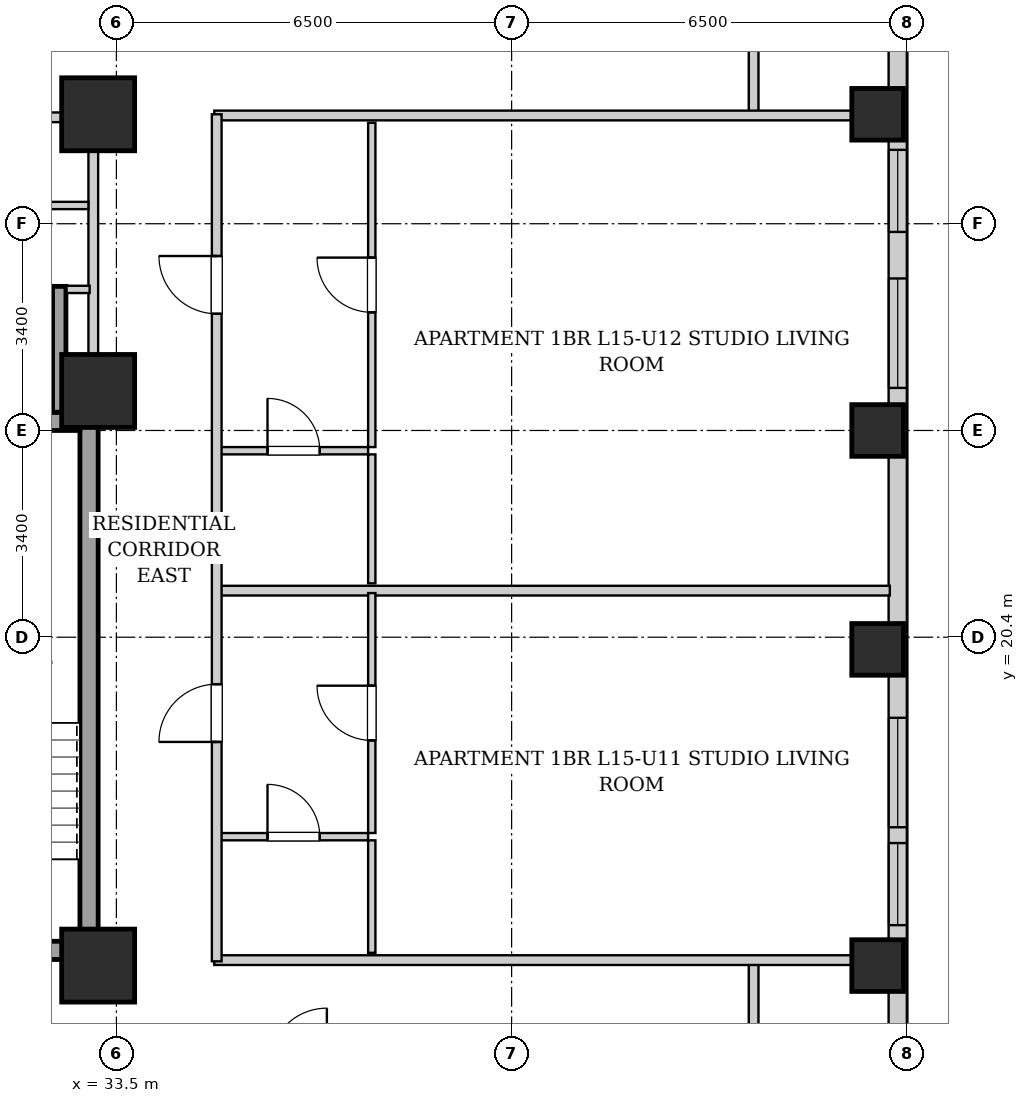
"""IFC4 building model, lengths in metres.
Left out: names, types, materials, properties, quantities, classifications, styles, units other than length and angle.
Written with IfcOpenShell. Run it as: python <this file> out.ifc"""

import sys

from ifc_helpers import new_model, si_unit, direction, frame, frame_2d, origin, origin_2d, place, context, subcontext, project, spatial, rectangle, extrude, element, fill, save


model = new_model("IFC4")
c1 = context("Model", 3, precision=1e-05, world=origin(), true_north=direction((0.0, 1.0)))
c2 = subcontext(c1, "Body", "Model", "MODEL_VIEW")
j1 = project(units=[si_unit("LENGTHUNIT", "METRE"), si_unit("PLANEANGLEUNIT", "RADIAN")], contexts=[c1])
p1 = place(None, origin())
s1 = spatial("IfcSite", under=j1, at=p1, CompositionType="ELEMENT")
p2 = place(p1, origin())
s2 = spatial("IfcBuilding", under=s1, at=p2, CompositionType="ELEMENT")
p3 = place(p2, frame((0.0, 0.0, 57.8)))
s3 = spatial("IfcBuildingStorey", under=s2, at=p3, CompositionType="ELEMENT", Elevation=57.8)
for number, where, z_axis, x_axis in (
    (1, (46.02, 15.0, 0.0), (0.0, 0.0, 1.0), (1.0, 0.0, 0.0)),
    (2, (46.02, 20.2, 0.0), (0.0, 0.0, 1.0), (1.0, 0.0, 0.0)),
    (3, (46.02, 23.8, 0.0), (0.0, 0.0, 1.0), (1.0, 0.0, 0.0)),
    (4, (46.02, 29.0, 0.0), (0.0, 0.0, 1.0), (1.0, 0.0, 0.0)),
):
    element("IfcColumn", number, at=place(p3, frame(where, z_axis=z_axis, x_axis=x_axis)), inside=s3, PredefinedType="COLUMN", context=c2, shape_type="SweptSolid", body=[
        extrude(rectangle(XDim=0.85, YDim=0.85, at=origin_2d()), origin(), (0.0, 0.0, 1.0), 3.2),
    ])
for number, where, z_axis, x_axis in (
    (5, (33.2, 15.0, 0.0), (0.0, 0.0, 1.0), (1.0, 0.0, 0.0)),
    (6, (33.2, 29.0, 0.0), (0.0, 0.0, 1.0), (1.0, 0.0, 0.0)),
    (7, (33.2, 24.45, 0.0), (0.0, 0.0, 1.0), (1.0, 0.0, 0.0)),
):
    element("IfcColumn", number, at=place(p3, frame(where, z_axis=z_axis, x_axis=x_axis)), inside=s3, PredefinedType="COLUMN", context=c2, shape_type="SweptSolid", body=[
        extrude(rectangle(XDim=1.2, YDim=1.2, at=origin_2d()), origin(), (0.0, 0.0, 1.0), 3.2),
    ])
p4 = place(p3, frame((46.35, 45.1, 0.0), z_axis=(0.0, 0.0, 1.0), x_axis=(0.0, -1.0, 0.0)))
e8 = element("IfcWall", 8, at=p4, inside=s3, PredefinedType="SOLIDWALL", context=c2, shape_type="SweptSolid", body=[
    extrude(rectangle(XDim=42.6, YDim=0.3, at=frame_2d((21.3, 0.0))), origin(), (0.0, 0.0, 1.0), 1.975),
])
p5 = place(p4, frame((37.575, 0.0, 0.55)))
e9 = element("IfcOpeningElement", 9, at=p5, cuts=e8, PredefinedType="OPENING", context=c2, shape_type="SweptSolid", body=[
    extrude(rectangle(XDim=1.8, YDim=1.2, at=frame_2d((0.9, 0.6))), frame((0.0, 0.16, 0.0), z_axis=(0.0, -1.0, 0.0), x_axis=(1.0, 0.0, 0.0)), (0.0, 0.0, 1.0), 0.32),
])
p6 = place(p4, frame((34.85, 0.0, 0.55)))
e10 = element("IfcOpeningElement", 10, at=p6, cuts=e8, PredefinedType="OPENING", context=c2, shape_type="SweptSolid", body=[
    extrude(rectangle(XDim=1.35, YDim=1.2, at=frame_2d((0.675, 0.6))), frame((0.0, 0.16, 0.0), z_axis=(0.0, -1.0, 0.0), x_axis=(1.0, 0.0, 0.0)), (0.0, 0.0, 1.0), 0.32),
])
p7 = place(p4, frame((3.715, 0.0, 0.55)))
e11 = element("IfcOpeningElement", 11, at=p7, cuts=e8, PredefinedType="OPENING", context=c2, shape_type="SweptSolid", body=[
    extrude(rectangle(XDim=1.8, YDim=1.2, at=frame_2d((0.9, 0.6))), frame((0.0, 0.16, 0.0), z_axis=(0.0, -1.0, 0.0), x_axis=(1.0, 0.0, 0.0)), (0.0, 0.0, 1.0), 0.32),
])
p8 = place(p4, frame((1.185, 0.0, 0.55)))
e12 = element("IfcOpeningElement", 12, at=p8, cuts=e8, PredefinedType="OPENING", context=c2, shape_type="SweptSolid", body=[
    extrude(rectangle(XDim=1.35, YDim=1.2, at=frame_2d((0.675, 0.6))), frame((0.0, 0.16, 0.0), z_axis=(0.0, -1.0, 0.0), x_axis=(1.0, 0.0, 0.0)), (0.0, 0.0, 1.0), 0.32),
])
p9 = place(p4, frame((26.025, 0.0, 0.55)))
e13 = element("IfcOpeningElement", 13, at=p9, cuts=e8, PredefinedType="OPENING", context=c2, shape_type="SweptSolid", body=[
    extrude(rectangle(XDim=1.8, YDim=1.2, at=frame_2d((0.9, 0.6))), frame((0.0, 0.16, 0.0), z_axis=(0.0, -1.0, 0.0), x_axis=(1.0, 0.0, 0.0)), (0.0, 0.0, 1.0), 0.32),
])
p10 = place(p4, frame((28.085, 0.0, 0.55)))
e14 = element("IfcOpeningElement", 14, at=p10, cuts=e8, PredefinedType="OPENING", context=c2, shape_type="SweptSolid", body=[
    extrude(rectangle(XDim=1.35, YDim=1.2, at=frame_2d((0.675, 0.6))), frame((0.0, 0.16, 0.0), z_axis=(0.0, -1.0, 0.0), x_axis=(1.0, 0.0, 0.0)), (0.0, 0.0, 1.0), 0.32),
])
p11 = place(p4, frame((18.8, 0.0, 0.55)))
e15 = element("IfcOpeningElement", 15, at=p11, cuts=e8, PredefinedType="OPENING", context=c2, shape_type="SweptSolid", body=[
    extrude(rectangle(XDim=1.8, YDim=1.2, at=frame_2d((0.9, 0.6))), frame((0.0, 0.16, 0.0), z_axis=(0.0, -1.0, 0.0), x_axis=(1.0, 0.0, 0.0)), (0.0, 0.0, 1.0), 0.32),
])
p12 = place(p4, frame((16.685, 0.0, 0.55)))
e16 = element("IfcOpeningElement", 16, at=p12, cuts=e8, PredefinedType="OPENING", context=c2, shape_type="SweptSolid", body=[
    extrude(rectangle(XDim=1.35, YDim=1.2, at=frame_2d((0.675, 0.6))), frame((0.0, 0.16, 0.0), z_axis=(0.0, -1.0, 0.0), x_axis=(1.0, 0.0, 0.0)), (0.0, 0.0, 1.0), 0.32),
])
p13 = place(p3, frame((33.05, 15.1, 0.0), z_axis=(0.0, 0.0, 1.0), x_axis=(0.0, 1.0, 0.0)))
e17 = element("IfcWall", 17, at=p13, inside=s3, PredefinedType="SHEAR", context=c2, shape_type="SweptSolid", body=[
    extrude(rectangle(XDim=9.0, YDim=0.3, at=frame_2d((4.5, 0.0))), origin(), (0.0, 0.0, 1.0), 2.94),
])
p14 = place(p3, frame((30.05, 23.95, 0.0), z_axis=(0.0, 0.0, 1.0), x_axis=(1.0, 0.0, 0.0)))
e18 = element("IfcWall", 18, at=p14, inside=s3, PredefinedType="SHEAR", context=c2, shape_type="SweptSolid", body=[
    extrude(rectangle(XDim=2.85, YDim=0.3, at=frame_2d((1.425, 0.0))), origin(), (0.0, 0.0, 1.0), 2.94),
])
p15 = place(p3, frame((30.05, 15.25, 0.0), z_axis=(0.0, 0.0, 1.0), x_axis=(1.0, 0.0, 0.0)))
e19 = element("IfcWall", 19, at=p15, inside=s3, PredefinedType="SHEAR", context=c2, shape_type="SweptSolid", body=[
    extrude(rectangle(XDim=2.85, YDim=0.3, at=frame_2d((1.425, 0.0))), origin(), (0.0, 0.0, 1.0), 2.94),
])
p16 = place(p15, frame((0.86, 0.0, 0.0)))
e20 = element("IfcOpeningElement", 20, at=p16, cuts=e19, PredefinedType="OPENING", context=c2, shape_type="SweptSolid", body=[
    extrude(rectangle(XDim=1.1, YDim=2.05, at=frame_2d((0.55, 1.025))), frame((0.0, 0.16, 0.0), z_axis=(0.0, -1.0, 0.0), x_axis=(1.0, 0.0, 0.0)), (0.0, 0.0, 1.0), 0.32),
])
p17 = place(p3, frame((32.56, 24.1, 0.0), z_axis=(0.0, 0.0, 1.0), x_axis=(0.0, 1.0, 0.0)))
e21 = element("IfcWall", 21, at=p17, inside=s3, PredefinedType="SHEAR", context=c2, shape_type="SweptSolid", body=[
    extrude(rectangle(XDim=2.07, YDim=0.22, at=frame_2d((1.035, 0.0))), origin(), (0.0, 0.0, 1.0), 2.94),
])
p18 = place(p3, frame((33.12, 24.12, 0.0), z_axis=(0.0, 0.0, 1.0), x_axis=(0.0, 1.0, 0.0)))
e22 = element("IfcWall", 22, at=p18, inside=s3, PredefinedType="PARTITIONING", context=c2, shape_type="SweptSolid", body=[
    extrude(rectangle(XDim=4.76, YDim=0.16, at=frame_2d((2.38, 0.0))), origin(), (0.0, 0.0, 1.0), 2.275),
])
p19 = place(p3, frame((32.68, 26.12, 0.0), z_axis=(0.0, 0.0, 1.0), x_axis=(1.0, 0.0, 0.0)))
e23 = element("IfcWall", 23, at=p19, inside=s3, PredefinedType="PARTITIONING", context=c2, shape_type="SweptSolid", body=[
    extrude(rectangle(XDim=0.38, YDim=0.12, at=frame_2d((0.19, 0.0))), origin(), (0.0, 0.0, 1.0), 2.94),
])
p20 = place(p3, frame((30.16, 27.5, 0.0), z_axis=(0.0, 0.0, 1.0), x_axis=(1.0, 0.0, 0.0)))
e24 = element("IfcWall", 24, at=p20, inside=s3, PredefinedType="PARTITIONING", context=c2, shape_type="SweptSolid", body=[
    extrude(rectangle(XDim=2.88, YDim=0.12, at=frame_2d((1.44, 0.0))), origin(), (0.0, 0.0, 1.0), 2.94),
])
p21 = place(p20, frame((0.97, 0.0, 0.0)))
e25 = element("IfcOpeningElement", 25, at=p21, cuts=e24, PredefinedType="OPENING", context=c2, shape_type="SweptSolid", body=[
    extrude(rectangle(XDim=0.86, YDim=2.05, at=frame_2d((0.43, 1.025))), frame((0.0, 0.07, 0.0), z_axis=(0.0, -1.0, 0.0), x_axis=(1.0, 0.0, 0.0)), (0.0, 0.0, 1.0), 0.14),
])
p22 = place(p3, frame((30.08, 28.95, 0.0), z_axis=(0.0, 0.0, 1.0), x_axis=(1.0, 0.0, 0.0)))
e26 = element("IfcWall", 26, at=p22, inside=s3, PredefinedType="PARTITIONING", context=c2, shape_type="SweptSolid", body=[
    extrude(rectangle(XDim=2.96, YDim=0.16, at=frame_2d((1.48, 0.0))), origin(), (0.0, 0.0, 1.0), 2.94),
])
p23 = place(p22, frame((1.045, 0.0, 0.0)))
e27 = element("IfcOpeningElement", 27, at=p23, cuts=e26, PredefinedType="OPENING", context=c2, shape_type="SweptSolid", body=[
    extrude(rectangle(XDim=0.86, YDim=2.05, at=frame_2d((0.43, 1.025))), frame((0.0, 0.09, 0.0), z_axis=(0.0, -1.0, 0.0), x_axis=(1.0, 0.0, 0.0)), (0.0, 0.0, 1.0), 0.18),
])
for number, where, z_axis, x_axis in (
    (28, (43.98, 13.35, 0.0), (0.0, 0.0, 1.0), (0.0, 1.0, 0.0)),
    (29, (43.98, 28.98, 0.0), (0.0, 0.0, 1.0), (0.0, 1.0, 0.0)),
):
    element("IfcWall", number, at=place(p3, frame(where, z_axis=z_axis, x_axis=x_axis)), inside=s3, PredefinedType="PARTITIONING", context=c2, shape_type="SweptSolid", body=[
        extrude(rectangle(XDim=1.74, YDim=0.16, at=frame_2d((0.87, 0.0))), origin(), (0.0, 0.0, 1.0), 2.94),
    ])
for number, where, z_axis, x_axis in (
    (30, (35.11, 15.09, 0.0), (0.0, 0.0, 1.0), (1.0, 0.0, 0.0)),
    (31, (35.11, 28.98, 0.0), (0.0, 0.0, 1.0), (1.0, 0.0, 0.0)),
):
    element("IfcWall", number, at=place(p3, frame(where, z_axis=z_axis, x_axis=x_axis)), inside=s3, PredefinedType="PARTITIONING", context=c2, shape_type="SweptSolid", body=[
        extrude(rectangle(XDim=11.11, YDim=0.16, at=frame_2d((5.555, 0.0))), origin(), (0.0, 0.0, 1.0), 2.232),
    ])
p24 = place(p3, frame((35.19, 21.166, 0.0), z_axis=(0.0, 0.0, 1.0), x_axis=(1.0, 0.0, 0.0)))
e32 = element("IfcWall", 32, at=p24, inside=s3, PredefinedType="PARTITIONING", context=c2, shape_type="SweptSolid", body=[
    extrude(rectangle(XDim=11.03, YDim=0.16, at=frame_2d((5.515, 0.0))), origin(), (0.0, 0.0, 1.0), 2.94),
])
p25 = place(p3, frame((35.19, 17.12, 0.0), z_axis=(0.0, 0.0, 1.0), x_axis=(1.0, 0.0, 0.0)))
e33 = element("IfcWall", 33, at=p25, inside=s3, PredefinedType="PARTITIONING", context=c2, shape_type="SweptSolid", body=[
    extrude(rectangle(XDim=2.45, YDim=0.12, at=frame_2d((1.225, 0.0))), origin(), (0.0, 0.0, 1.0), 2.94),
])
p26 = place(p25, frame((0.795, 0.0, 0.0)))
e34 = element("IfcOpeningElement", 34, at=p26, cuts=e33, PredefinedType="OPENING", context=c2, shape_type="SweptSolid", body=[
    extrude(rectangle(XDim=0.86, YDim=2.05, at=frame_2d((0.43, 1.025))), frame((0.0, 0.07, 0.0), z_axis=(0.0, -1.0, 0.0), x_axis=(1.0, 0.0, 0.0)), (0.0, 0.0, 1.0), 0.14),
])
p27 = place(p3, frame((37.7, 15.21, 0.0), z_axis=(0.0, 0.0, 1.0), x_axis=(0.0, 1.0, 0.0)))
e35 = element("IfcWall", 35, at=p27, inside=s3, PredefinedType="PARTITIONING", context=c2, shape_type="SweptSolid", body=[
    extrude(rectangle(XDim=1.85, YDim=0.12, at=frame_2d((0.925, 0.0))), origin(), (0.0, 0.0, 1.0), 2.94),
])
p28 = place(p3, frame((37.7, 17.18, 0.0), z_axis=(0.0, 0.0, 1.0), x_axis=(0.0, 1.0, 0.0)))
e36 = element("IfcWall", 36, at=p28, inside=s3, PredefinedType="PARTITIONING", context=c2, shape_type="SweptSolid", body=[
    extrude(rectangle(XDim=3.946, YDim=0.12, at=frame_2d((1.973, 0.0))), origin(), (0.0, 0.0, 1.0), 2.94),
])
p29 = place(p28, frame((1.523, 0.0, 0.0)))
e37 = element("IfcOpeningElement", 37, at=p29, cuts=e36, PredefinedType="OPENING", context=c2, shape_type="SweptSolid", body=[
    extrude(rectangle(XDim=0.9, YDim=2.05, at=frame_2d((0.45, 1.025))), frame((0.0, 0.07, 0.0), z_axis=(0.0, -1.0, 0.0), x_axis=(1.0, 0.0, 0.0)), (0.0, 0.0, 1.0), 0.14),
])
p30 = place(p3, frame((35.19, 23.467, 0.0), z_axis=(0.0, 0.0, 1.0), x_axis=(1.0, 0.0, 0.0)))
e38 = element("IfcWall", 38, at=p30, inside=s3, PredefinedType="PARTITIONING", context=c2, shape_type="SweptSolid", body=[
    extrude(rectangle(XDim=2.45, YDim=0.12, at=frame_2d((1.225, 0.0))), origin(), (0.0, 0.0, 1.0), 2.94),
])
p31 = place(p30, frame((0.795, 0.0, 0.0)))
e39 = element("IfcOpeningElement", 39, at=p31, cuts=e38, PredefinedType="OPENING", context=c2, shape_type="SweptSolid", body=[
    extrude(rectangle(XDim=0.86, YDim=2.05, at=frame_2d((0.43, 1.025))), frame((0.0, 0.07, 0.0), z_axis=(0.0, -1.0, 0.0), x_axis=(1.0, 0.0, 0.0)), (0.0, 0.0, 1.0), 0.14),
])
p32 = place(p3, frame((37.7, 21.286, 0.0), z_axis=(0.0, 0.0, 1.0), x_axis=(0.0, 1.0, 0.0)))
e40 = element("IfcWall", 40, at=p32, inside=s3, PredefinedType="PARTITIONING", context=c2, shape_type="SweptSolid", body=[
    extrude(rectangle(XDim=2.121, YDim=0.12, at=frame_2d((1.061, 0.0))), origin(), (0.0, 0.0, 1.0), 2.94),
])
p33 = place(p3, frame((37.7, 23.527, 0.0), z_axis=(0.0, 0.0, 1.0), x_axis=(0.0, 1.0, 0.0)))
e41 = element("IfcWall", 41, at=p33, inside=s3, PredefinedType="PARTITIONING", context=c2, shape_type="SweptSolid", body=[
    extrude(rectangle(XDim=5.333, YDim=0.12, at=frame_2d((2.667, 0.0))), origin(), (0.0, 0.0, 1.0), 2.94),
])
p34 = place(p33, frame((2.216, 0.0, 0.0)))
e42 = element("IfcOpeningElement", 42, at=p34, cuts=e41, PredefinedType="OPENING", context=c2, shape_type="SweptSolid", body=[
    extrude(rectangle(XDim=0.9, YDim=2.05, at=frame_2d((0.45, 1.025))), frame((0.0, 0.07, 0.0), z_axis=(0.0, -1.0, 0.0), x_axis=(1.0, 0.0, 0.0)), (0.0, 0.0, 1.0), 0.14),
])
p35 = place(p3, frame((35.15, 15.07, 0.0), z_axis=(0.0, 0.0, 1.0), x_axis=(0.0, 1.0, 0.0)))
e43 = element("IfcWall", 43, at=p35, inside=s3, PredefinedType="PARTITIONING", context=c2, shape_type="SweptSolid", body=[
    extrude(rectangle(XDim=13.93, YDim=0.16, at=frame_2d((6.965, 0.0))), origin(), (0.0, 0.0, 1.0), 2.94),
])
p36 = place(p35, frame((3.608, 0.0, 0.0)))
e44 = element("IfcOpeningElement", 44, at=p36, cuts=e43, PredefinedType="OPENING", context=c2, shape_type="SweptSolid", body=[
    extrude(rectangle(XDim=0.95, YDim=2.1, at=frame_2d((0.475, 1.05))), frame((0.0, 0.09, 0.0), z_axis=(0.0, -1.0, 0.0), x_axis=(1.0, 0.0, 0.0)), (0.0, 0.0, 1.0), 0.18),
])
p37 = place(p35, frame((10.649, 0.0, 0.0)))
e45 = element("IfcOpeningElement", 45, at=p37, cuts=e43, PredefinedType="OPENING", context=c2, shape_type="SweptSolid", body=[
    extrude(rectangle(XDim=0.95, YDim=2.1, at=frame_2d((0.475, 1.05))), frame((0.0, 0.09, 0.0), z_axis=(0.0, -1.0, 0.0), x_axis=(1.0, 0.0, 0.0)), (0.0, 0.0, 1.0), 0.18),
])
p38 = place(p26, origin())
e46 = element("IfcDoor", 46, at=p38, inside=s3, OperationType="SINGLE_SWING_LEFT", PredefinedType="DOOR", context=c2, shape_type="SweptSolid", body=[
    extrude(rectangle(XDim=0.86, YDim=2.05, at=frame_2d((0.43, 1.025))), frame((0.0, 0.025, 0.0), z_axis=(0.0, -1.0, 0.0), x_axis=(1.0, 0.0, 0.0)), (0.0, 0.0, 1.0), 0.05),
])
fill(e34, e46)
p39 = place(p29, origin())
e47 = element("IfcDoor", 47, at=p39, inside=s3, OperationType="SINGLE_SWING_RIGHT", PredefinedType="DOOR", context=c2, shape_type="SweptSolid", body=[
    extrude(rectangle(XDim=0.9, YDim=2.05, at=frame_2d((0.45, 1.025))), frame((0.0, 0.025, 0.0), z_axis=(0.0, -1.0, 0.0), x_axis=(1.0, 0.0, 0.0)), (0.0, 0.0, 1.0), 0.05),
])
fill(e37, e47)
p40 = place(p31, origin())
e48 = element("IfcDoor", 48, at=p40, inside=s3, OperationType="SINGLE_SWING_LEFT", PredefinedType="DOOR", context=c2, shape_type="SweptSolid", body=[
    extrude(rectangle(XDim=0.86, YDim=2.05, at=frame_2d((0.43, 1.025))), frame((0.0, 0.025, 0.0), z_axis=(0.0, -1.0, 0.0), x_axis=(1.0, 0.0, 0.0)), (0.0, 0.0, 1.0), 0.05),
])
fill(e39, e48)
p41 = place(p34, origin())
e49 = element("IfcDoor", 49, at=p41, inside=s3, OperationType="SINGLE_SWING_RIGHT", PredefinedType="DOOR", context=c2, shape_type="SweptSolid", body=[
    extrude(rectangle(XDim=0.9, YDim=2.05, at=frame_2d((0.45, 1.025))), frame((0.0, 0.025, 0.0), z_axis=(0.0, -1.0, 0.0), x_axis=(1.0, 0.0, 0.0)), (0.0, 0.0, 1.0), 0.05),
])
fill(e42, e49)
p42 = place(p36, origin())
e50 = element("IfcDoor", 50, at=p42, inside=s3, OperationType="SINGLE_SWING_LEFT", PredefinedType="DOOR", context=c2, shape_type="SweptSolid", body=[
    extrude(rectangle(XDim=0.95, YDim=2.1, at=frame_2d((0.475, 1.05))), frame((0.0, 0.025, 0.0), z_axis=(0.0, -1.0, 0.0), x_axis=(1.0, 0.0, 0.0)), (0.0, 0.0, 1.0), 0.05),
])
fill(e44, e50)
p43 = place(p37, origin())
e51 = element("IfcDoor", 51, at=p43, inside=s3, OperationType="SINGLE_SWING_RIGHT", PredefinedType="DOOR", context=c2, shape_type="SweptSolid", body=[
    extrude(rectangle(XDim=0.95, YDim=2.1, at=frame_2d((0.475, 1.05))), frame((0.0, 0.025, 0.0), z_axis=(0.0, -1.0, 0.0), x_axis=(1.0, 0.0, 0.0)), (0.0, 0.0, 1.0), 0.05),
])
fill(e45, e51)
p44 = place(p9, origin())
e52 = element("IfcWindow", 52, at=p44, inside=s3, PartitioningType="DOUBLE_PANEL_VERTICAL", PredefinedType="WINDOW", context=c2, shape_type="SweptSolid", body=[
    extrude(rectangle(XDim=1.8, YDim=1.2, at=frame_2d((0.9, 0.6))), frame((0.0, 0.03, 0.0), z_axis=(0.0, -1.0, 0.0), x_axis=(1.0, 0.0, 0.0)), (0.0, 0.0, 1.0), 0.06),
])
fill(e13, e52)
p45 = place(p10, origin())
e53 = element("IfcWindow", 53, at=p45, inside=s3, PartitioningType="SINGLE_PANEL", PredefinedType="WINDOW", context=c2, shape_type="SweptSolid", body=[
    extrude(rectangle(XDim=1.35, YDim=1.2, at=frame_2d((0.675, 0.6))), frame((0.0, 0.03, 0.0), z_axis=(0.0, -1.0, 0.0), x_axis=(1.0, 0.0, 0.0)), (0.0, 0.0, 1.0), 0.06),
])
fill(e14, e53)
p46 = place(p11, origin())
e54 = element("IfcWindow", 54, at=p46, inside=s3, PartitioningType="DOUBLE_PANEL_VERTICAL", PredefinedType="WINDOW", context=c2, shape_type="SweptSolid", body=[
    extrude(rectangle(XDim=1.8, YDim=1.2, at=frame_2d((0.9, 0.6))), frame((0.0, 0.03, 0.0), z_axis=(0.0, -1.0, 0.0), x_axis=(1.0, 0.0, 0.0)), (0.0, 0.0, 1.0), 0.06),
])
fill(e15, e54)
p47 = place(p12, origin())
e55 = element("IfcWindow", 55, at=p47, inside=s3, PartitioningType="SINGLE_PANEL", PredefinedType="WINDOW", context=c2, shape_type="SweptSolid", body=[
    extrude(rectangle(XDim=1.35, YDim=1.2, at=frame_2d((0.675, 0.6))), frame((0.0, 0.03, 0.0), z_axis=(0.0, -1.0, 0.0), x_axis=(1.0, 0.0, 0.0)), (0.0, 0.0, 1.0), 0.06),
])
fill(e16, e55)
save(model, sys.argv[1])
